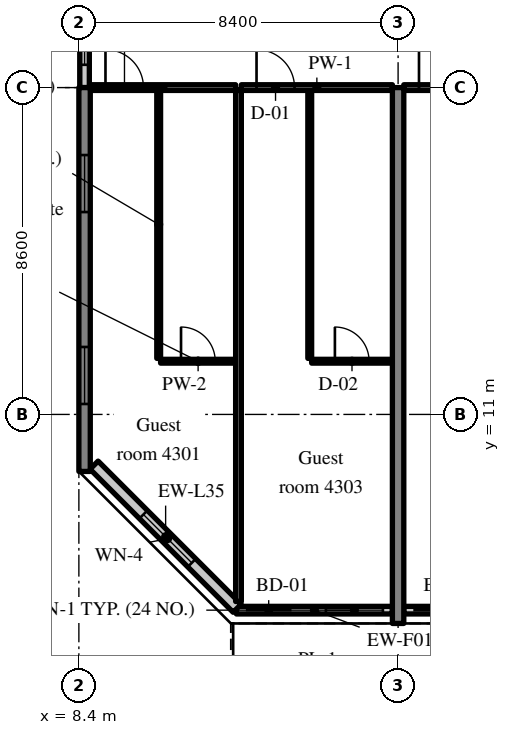
"""IFC4 building model, lengths in metres.
Left out: names, types, materials, properties, quantities, classifications, styles, units other than length and angle.
Written with IfcOpenShell. Run it as: python <this file> out.ifc"""

import sys

from ifc_helpers import new_model, si_unit, direction, frame, frame_2d, origin, place, context, subcontext, project, spatial, rectangle, extrude, source, transform, mapped, element, fill, save


model = new_model("IFC4")
c1 = context("Model", 3, precision=1e-05, world=origin(), true_north=direction((0.0, 1.0)))
c2 = subcontext(c1, "Body", "Model", "MODEL_VIEW")
j1 = project(units=[si_unit("LENGTHUNIT", "METRE"), si_unit("PLANEANGLEUNIT", "RADIAN")], contexts=[c1])
p1 = place(None, origin())
s1 = spatial("IfcSite", under=j1, at=p1, CompositionType="ELEMENT")
p2 = place(p1, origin())
s2 = spatial("IfcBuilding", under=s1, at=p2, CompositionType="ELEMENT")
p3 = place(p2, frame((0.0, 0.0, 178.2)))
s3 = spatial("IfcBuildingStorey", under=s2, at=p3, CompositionType="ELEMENT", Elevation=178.2)
m1 = source(origin(), c2, "Body", "SweptSolid", [
    extrude(rectangle(XDim=10.1, YDim=0.3, at=frame_2d((5.05, 0.0))), origin(), (0.0, 0.0, 1.0), 3.52),
])
p4 = place(p3, frame((8.55, 9.5, 0.0), z_axis=(0.0, 0.0, 1.0), x_axis=(0.0, 1.0, 0.0)))
e1 = element("IfcWall", 1, at=p4, inside=s3, PredefinedType="SHEAR", context=c2, shape_type="MappedRepresentation", body=[
    mapped(m1, transform((0.0, 0.0, 0.0), scale=1.0)),
])
m2 = source(origin(), c2, "Body", "SweptSolid", [
    extrude(rectangle(XDim=1.5, YDim=1.5, at=frame_2d((0.75, 0.75))), frame((0.0, 0.16, 0.0), z_axis=(0.0, -1.0, 0.0), x_axis=(1.0, 0.0, 0.0)), (0.0, 0.0, 1.0), 0.32),
])
p5 = place(p4, frame((1.775, 0.0, 0.9)))
e2 = element("IfcOpeningElement", 2, at=p5, cuts=e1, PredefinedType="OPENING", context=c2, shape_type="MappedRepresentation", body=[
    mapped(m2, transform((0.0, 0.0, 0.0), scale=1.0)),
])
p6 = place(p4, frame((6.825, 0.0, 0.9)))
e3 = element("IfcOpeningElement", 3, at=p6, cuts=e1, PredefinedType="OPENING", context=c2, shape_type="MappedRepresentation", body=[
    mapped(m2, transform((0.0, 0.0, 0.0), scale=1.0)),
])
m3 = source(origin(), c2, "Body", "SweptSolid", [
    extrude(rectangle(XDim=14.1, YDim=0.3, at=frame_2d((7.05, 0.0))), origin(), (0.0, 0.0, 1.0), 3.52),
])
p7 = place(p3, frame((16.8, 5.5, 0.0), z_axis=(0.0, 0.0, 1.0), x_axis=(0.0, 1.0, 0.0)))
e4 = element("IfcWall", 4, at=p7, inside=s3, PredefinedType="SHEAR", context=c2, shape_type="MappedRepresentation", body=[
    mapped(m3, transform((0.0, 0.0, 0.0), scale=1.0)),
])
m4 = source(origin(), c2, "Body", "SweptSolid", [
    extrude(rectangle(XDim=4.105, YDim=0.2, at=frame_2d((2.052, 0.0))), origin(), (0.0, 0.0, 1.0), 2.87),
])
p8 = place(p3, frame((12.545, 5.85, 0.0), z_axis=(0.0, 0.0, 1.0), x_axis=(1.0, 0.0, 0.0)))
e5 = element("IfcWall", 5, at=p8, inside=s3, PredefinedType="SOLIDWALL", context=c2, shape_type="MappedRepresentation", body=[
    mapped(m4, transform((0.0, 0.0, 0.0), scale=1.0)),
])
m5 = source(origin(), c2, "Body", "SweptSolid", [
    extrude(rectangle(XDim=1.2, YDim=2.4, at=frame_2d((0.6, 1.2))), frame((0.0, 0.11, 0.0), z_axis=(0.0, -1.0, 0.0), x_axis=(1.0, 0.0, 0.0)), (0.0, 0.0, 1.0), 0.22),
])
p9 = place(p8, frame((0.25, 0.0, 0.0)))
e6 = element("IfcOpeningElement", 6, at=p9, cuts=e5, PredefinedType="OPENING", context=c2, shape_type="MappedRepresentation", body=[
    mapped(m5, transform((0.0, 0.0, 0.0), scale=1.0)),
])
m6 = source(origin(), c2, "Body", "SweptSolid", [
    extrude(rectangle(XDim=1.5, YDim=1.5, at=frame_2d((0.75, 0.75))), frame((0.0, 0.11, 0.0), z_axis=(0.0, -1.0, 0.0), x_axis=(1.0, 0.0, 0.0)), (0.0, 0.0, 1.0), 0.22),
])
p10 = place(p8, frame((2.355, 0.0, 0.9)))
e7 = element("IfcOpeningElement", 7, at=p10, cuts=e5, PredefinedType="OPENING", context=c2, shape_type="MappedRepresentation", body=[
    mapped(m6, transform((0.0, 0.0, 0.0), scale=1.0)),
])
m7 = source(origin(), c2, "Body", "SweptSolid", [
    extrude(rectangle(XDim=8.1, YDim=0.2, at=frame_2d((4.05, 0.0))), origin(), (0.0, 0.0, 1.0), 2.87),
])
p11 = place(p3, frame((16.95, 5.85, 0.0), z_axis=(0.0, 0.0, 1.0), x_axis=(1.0, 0.0, 0.0)))
e8 = element("IfcWall", 8, at=p11, inside=s3, PredefinedType="SOLIDWALL", context=c2, shape_type="MappedRepresentation", body=[
    mapped(m7, transform((0.0, 0.0, 0.0), scale=1.0)),
])
p12 = place(p11, frame((0.25, 0.0, 0.0)))
e9 = element("IfcOpeningElement", 9, at=p12, cuts=e8, PredefinedType="OPENING", context=c2, shape_type="MappedRepresentation", body=[
    mapped(m5, transform((0.0, 0.0, 0.0), scale=1.0)),
])
p13 = place(p11, frame((2.3, 0.0, 0.9)))
e10 = element("IfcOpeningElement", 10, at=p13, cuts=e8, PredefinedType="OPENING", context=c2, shape_type="MappedRepresentation", body=[
    mapped(m6, transform((0.0, 0.0, 0.0), scale=1.0)),
])
p14 = place(p11, frame((4.3, 0.0, 0.0)))
e11 = element("IfcOpeningElement", 11, at=p14, cuts=e8, PredefinedType="OPENING", context=c2, shape_type="MappedRepresentation", body=[
    mapped(m5, transform((0.0, 0.0, 0.0), scale=1.0)),
])
p15 = place(p11, frame((6.35, 0.0, 0.9)))
e12 = element("IfcOpeningElement", 12, at=p15, cuts=e8, PredefinedType="OPENING", context=c2, shape_type="MappedRepresentation", body=[
    mapped(m6, transform((0.0, 0.0, 0.0), scale=1.0)),
])
m8 = source(origin(), c2, "Body", "SweptSolid", [
    extrude(rectangle(XDim=5.326, YDim=0.3, at=frame_2d((2.663, 0.0))), origin(), (0.0, 0.0, 1.0), 3.52),
])
p16 = place(p3, frame((8.8, 9.666, 0.0), z_axis=(0.0, 0.0, 1.0), x_axis=(0.707083859269, -0.707129702361, 0.0)))
e13 = element("IfcWall", 13, at=p16, inside=s3, PredefinedType="SOLIDWALL", context=c2, shape_type="MappedRepresentation", body=[
    mapped(m8, transform((0.0, 0.0, 0.0), scale=1.0)),
])
m9 = source(origin(), c2, "Body", "SweptSolid", [
    extrude(rectangle(XDim=1.8, YDim=1.5, at=frame_2d((0.9, 0.75))), frame((0.0, 0.16, 0.0), z_axis=(0.0, -1.0, 0.0), x_axis=(1.0, 0.0, 0.0)), (0.0, 0.0, 1.0), 0.32),
])
p17 = place(p16, frame((1.836, 0.0, 0.9)))
e14 = element("IfcOpeningElement", 14, at=p17, cuts=e13, PredefinedType="OPENING", context=c2, shape_type="MappedRepresentation", body=[
    mapped(m9, transform((0.0, 0.0, 0.0), scale=1.0)),
])
m10 = source(origin(), c2, "Body", "SweptSolid", [
    extrude(rectangle(XDim=2.4, YDim=0.25, at=frame_2d((1.2, 0.0))), origin(), (0.0, 0.0, 1.0), 2.62),
])
p18 = place(p3, frame((8.55, 19.6, 0.0), z_axis=(0.0, 0.0, 1.0), x_axis=(0.0, 1.0, 0.0)))
e15 = element("IfcWall", 15, at=p18, inside=s3, PredefinedType="SOLIDWALL", context=c2, shape_type="MappedRepresentation", body=[
    mapped(m10, transform((0.0, 0.0, 0.0), scale=1.0)),
])
m11 = source(origin(), c2, "Body", "SweptSolid", [
    extrude(rectangle(XDim=1.2, YDim=1.5, at=frame_2d((0.6, 0.75))), frame((0.0, 0.135, 0.0), z_axis=(0.0, -1.0, 0.0), x_axis=(1.0, 0.0, 0.0)), (0.0, 0.0, 1.0), 0.27),
])
p19 = place(p18, frame((0.6, 0.0, 0.9)))
e16 = element("IfcOpeningElement", 16, at=p19, cuts=e15, PredefinedType="OPENING", context=c2, shape_type="MappedRepresentation", body=[
    mapped(m11, transform((0.0, 0.0, 0.0), scale=1.0)),
])
m12 = source(origin(), c2, "Body", "SweptSolid", [
    extrude(rectangle(XDim=7.05, YDim=0.1, at=frame_2d((3.525, 0.0))), origin(), (0.0, 0.0, 1.0), 3.52),
])
p20 = place(p3, frame((10.5, 12.475, 0.0), z_axis=(0.0, 0.0, 1.0), x_axis=(0.0, 1.0, 0.0)))
e17 = element("IfcWall", 17, at=p20, inside=s3, PredefinedType="PARTITIONING", context=c2, shape_type="MappedRepresentation", body=[
    mapped(m12, transform((0.0, 0.0, 0.0), scale=1.0)),
])
m13 = source(origin(), c2, "Body", "SweptSolid", [
    extrude(rectangle(XDim=1.975, YDim=0.1, at=frame_2d((0.987, 0.0))), origin(), (0.0, 0.0, 1.0), 3.52),
])
p21 = place(p3, frame((10.55, 12.4, 0.0), z_axis=(0.0, 0.0, 1.0), x_axis=(1.0, 0.0, 0.0)))
e18 = element("IfcWall", 18, at=p21, inside=s3, PredefinedType="PARTITIONING", context=c2, shape_type="MappedRepresentation", body=[
    mapped(m13, transform((0.0, 0.0, 0.0), scale=1.0)),
])
m14 = source(origin(), c2, "Body", "SweptSolid", [
    extrude(rectangle(XDim=0.9, YDim=2.1, at=frame_2d((0.45, 1.05))), frame((0.0, 0.06, 0.0), z_axis=(0.0, -1.0, 0.0), x_axis=(1.0, 0.0, 0.0)), (0.0, 0.0, 1.0), 0.12),
])
p22 = place(p21, frame((0.538, 0.0, 0.0)))
e19 = element("IfcOpeningElement", 19, at=p22, cuts=e18, PredefinedType="OPENING", context=c2, shape_type="MappedRepresentation", body=[
    mapped(m14, transform((0.0, 0.0, 0.0), scale=1.0)),
])
m15 = source(origin(), c2, "Body", "SweptSolid", [
    extrude(rectangle(XDim=3.825, YDim=0.15, at=frame_2d((1.913, 0.0))), origin(), (0.0, 0.0, 1.0), 2.82),
])
p23 = place(p3, frame((8.7, 19.6, 0.0), z_axis=(0.0, 0.0, 1.0), x_axis=(1.0, 0.0, 0.0)))
e20 = element("IfcWall", 20, at=p23, inside=s3, PredefinedType="PARTITIONING", context=c2, shape_type="MappedRepresentation", body=[
    mapped(m15, transform((0.0, 0.0, 0.0), scale=1.0)),
])
m16 = source(origin(), c2, "Body", "SweptSolid", [
    extrude(rectangle(XDim=1.0, YDim=2.1, at=frame_2d((0.5, 1.05))), frame((0.0, 0.085, 0.0), z_axis=(0.0, -1.0, 0.0), x_axis=(1.0, 0.0, 0.0)), (0.0, 0.0, 1.0), 0.17),
])
p24 = place(p23, frame((0.4, 0.0, 0.0)))
e21 = element("IfcOpeningElement", 21, at=p24, cuts=e20, PredefinedType="OPENING", context=c2, shape_type="MappedRepresentation", body=[
    mapped(m16, transform((0.0, 0.0, 0.0), scale=1.0)),
])
p25 = place(p3, frame((14.475, 12.475, 0.0), z_axis=(0.0, 0.0, 1.0), x_axis=(0.0, 1.0, 0.0)))
e22 = element("IfcWall", 22, at=p25, inside=s3, PredefinedType="PARTITIONING", context=c2, shape_type="MappedRepresentation", body=[
    mapped(m12, transform((0.0, 0.0, 0.0), scale=1.0)),
])
m17 = source(origin(), c2, "Body", "SweptSolid", [
    extrude(rectangle(XDim=2.125, YDim=0.1, at=frame_2d((1.062, 0.0))), origin(), (0.0, 0.0, 1.0), 3.52),
])
p26 = place(p3, frame((14.525, 12.4, 0.0), z_axis=(0.0, 0.0, 1.0), x_axis=(1.0, 0.0, 0.0)))
e23 = element("IfcWall", 23, at=p26, inside=s3, PredefinedType="PARTITIONING", context=c2, shape_type="MappedRepresentation", body=[
    mapped(m17, transform((0.0, 0.0, 0.0), scale=1.0)),
])
p27 = place(p26, frame((0.612, 0.0, 0.0)))
e24 = element("IfcOpeningElement", 24, at=p27, cuts=e23, PredefinedType="OPENING", context=c2, shape_type="MappedRepresentation", body=[
    mapped(m14, transform((0.0, 0.0, 0.0), scale=1.0)),
])
m18 = source(origin(), c2, "Body", "SweptSolid", [
    extrude(rectangle(XDim=3.975, YDim=0.15, at=frame_2d((1.987, 0.0))), origin(), (0.0, 0.0, 1.0), 2.82),
])
p28 = place(p3, frame((12.675, 19.6, 0.0), z_axis=(0.0, 0.0, 1.0), x_axis=(1.0, 0.0, 0.0)))
e25 = element("IfcWall", 25, at=p28, inside=s3, PredefinedType="PARTITIONING", context=c2, shape_type="MappedRepresentation", body=[
    mapped(m18, transform((0.0, 0.0, 0.0), scale=1.0)),
])
p29 = place(p28, frame((0.4, 0.0, 0.0)))
e26 = element("IfcOpeningElement", 26, at=p29, cuts=e25, PredefinedType="OPENING", context=c2, shape_type="MappedRepresentation", body=[
    mapped(m16, transform((0.0, 0.0, 0.0), scale=1.0)),
])
m19 = source(origin(), c2, "Body", "SweptSolid", [
    extrude(rectangle(XDim=13.447, YDim=0.15, at=frame_2d((6.724, 0.0))), origin(), (0.0, 0.0, 1.0), 3.52),
])
p30 = place(p3, frame((12.6, 6.078, 0.0), z_axis=(0.0, 0.0, 1.0), x_axis=(0.0, 1.0, 0.0)))
e27 = element("IfcWall", 27, at=p30, inside=s3, PredefinedType="PARTITIONING", context=c2, shape_type="MappedRepresentation", body=[
    mapped(m19, transform((0.0, 0.0, 0.0), scale=1.0)),
])
m20 = source(origin(), c2, "Body", "SweptSolid", [
    extrude(rectangle(XDim=3.975, YDim=0.15, at=frame_2d((1.988, 0.0))), origin(), (0.0, 0.0, 1.0), 2.82),
])
p31 = place(p3, frame((16.95, 19.6, 0.0), z_axis=(0.0, 0.0, 1.0), x_axis=(1.0, 0.0, 0.0)))
e28 = element("IfcWall", 28, at=p31, inside=s3, PredefinedType="PARTITIONING", context=c2, shape_type="MappedRepresentation", body=[
    mapped(m20, transform((0.0, 0.0, 0.0), scale=1.0)),
])
p32 = place(p31, frame((0.4, 0.0, 0.0)))
e29 = element("IfcOpeningElement", 29, at=p32, cuts=e28, PredefinedType="OPENING", context=c2, shape_type="MappedRepresentation", body=[
    mapped(m16, transform((0.0, 0.0, 0.0), scale=1.0)),
])
m21 = source(origin(), c2, "Body", "SweptSolid", [
    extrude(rectangle(XDim=1.2, YDim=2.4, at=frame_2d((0.6, 1.2))), frame((0.0, 0.025, 0.0), z_axis=(0.0, -1.0, 0.0), x_axis=(1.0, 0.0, 0.0)), (0.0, 0.0, 1.0), 0.05),
])
p33 = place(p9, origin())
e30 = element("IfcDoor", 30, at=p33, inside=s3, OperationType="SLIDING_TO_LEFT", PredefinedType="DOOR", context=c2, shape_type="MappedRepresentation", body=[
    mapped(m21, transform((0.0, 0.0, 0.0), scale=1.0)),
])
fill(e6, e30)
m22 = source(origin(), c2, "Body", "SweptSolid", [
    extrude(rectangle(XDim=1.5, YDim=1.5, at=frame_2d((0.75, 0.75))), frame((0.0, 0.03, 0.0), z_axis=(0.0, -1.0, 0.0), x_axis=(1.0, 0.0, 0.0)), (0.0, 0.0, 1.0), 0.06),
])
p34 = place(p10, origin())
e31 = element("IfcWindow", 31, at=p34, inside=s3, PartitioningType="SINGLE_PANEL", PredefinedType="WINDOW", context=c2, shape_type="MappedRepresentation", body=[
    mapped(m22, transform((0.0, 0.0, 0.0), scale=1.0)),
])
fill(e7, e31)
p35 = place(p12, origin())
e32 = element("IfcDoor", 32, at=p35, inside=s3, OperationType="SLIDING_TO_RIGHT", PredefinedType="DOOR", context=c2, shape_type="MappedRepresentation", body=[
    mapped(m21, transform((0.0, 0.0, 0.0), scale=1.0)),
])
fill(e9, e32)
m23 = source(origin(), c2, "Body", "SweptSolid", [
    extrude(rectangle(XDim=1.8, YDim=1.5, at=frame_2d((0.9, 0.75))), frame((0.0, 0.03, 0.0), z_axis=(0.0, -1.0, 0.0), x_axis=(1.0, 0.0, 0.0)), (0.0, 0.0, 1.0), 0.06),
])
p36 = place(p17, origin())
e33 = element("IfcWindow", 33, at=p36, inside=s3, PartitioningType="SINGLE_PANEL", PredefinedType="WINDOW", context=c2, shape_type="MappedRepresentation", body=[
    mapped(m23, transform((0.0, 0.0, 0.0), scale=1.0)),
])
fill(e14, e33)
p37 = place(p5, origin())
e34 = element("IfcWindow", 34, at=p37, inside=s3, PartitioningType="SINGLE_PANEL", PredefinedType="WINDOW", context=c2, shape_type="MappedRepresentation", body=[
    mapped(m22, transform((0.0, 0.0, 0.0), scale=1.0)),
])
fill(e2, e34)
p38 = place(p6, origin())
e35 = element("IfcWindow", 35, at=p38, inside=s3, PartitioningType="SINGLE_PANEL", PredefinedType="WINDOW", context=c2, shape_type="MappedRepresentation", body=[
    mapped(m22, transform((0.0, 0.0, 0.0), scale=1.0)),
])
fill(e3, e35)
m24 = source(origin(), c2, "Body", "SweptSolid", [
    extrude(rectangle(XDim=1.2, YDim=1.5, at=frame_2d((0.6, 0.75))), frame((0.0, 0.03, 0.0), z_axis=(0.0, -1.0, 0.0), x_axis=(1.0, 0.0, 0.0)), (0.0, 0.0, 1.0), 0.06),
])
p39 = place(p19, origin())
e36 = element("IfcWindow", 36, at=p39, inside=s3, PartitioningType="SINGLE_PANEL", PredefinedType="WINDOW", context=c2, shape_type="MappedRepresentation", body=[
    mapped(m24, transform((0.0, 0.0, 0.0), scale=1.0)),
])
fill(e16, e36)
m25 = source(origin(), c2, "Body", "SweptSolid", [
    extrude(rectangle(XDim=0.9, YDim=2.1, at=frame_2d((0.45, 1.05))), frame((0.0, 0.025, 0.0), z_axis=(0.0, -1.0, 0.0), x_axis=(1.0, 0.0, 0.0)), (0.0, 0.0, 1.0), 0.05),
])
p40 = place(p22, origin())
e37 = element("IfcDoor", 37, at=p40, inside=s3, OperationType="SINGLE_SWING_LEFT", PredefinedType="DOOR", context=c2, shape_type="MappedRepresentation", body=[
    mapped(m25, transform((0.0, 0.0, 0.0), scale=1.0)),
])
fill(e19, e37)
m26 = source(origin(), c2, "Body", "SweptSolid", [
    extrude(rectangle(XDim=1.0, YDim=2.1, at=frame_2d((0.5, 1.05))), frame((0.0, 0.025, 0.0), z_axis=(0.0, -1.0, 0.0), x_axis=(1.0, 0.0, 0.0)), (0.0, 0.0, 1.0), 0.05),
])
p41 = place(p24, origin())
e38 = element("IfcDoor", 38, at=p41, inside=s3, OperationType="SINGLE_SWING_LEFT", PredefinedType="DOOR", context=c2, shape_type="MappedRepresentation", body=[
    mapped(m26, transform((0.0, 0.0, 0.0), scale=1.0)),
])
fill(e21, e38)
p42 = place(p27, origin())
e39 = element("IfcDoor", 39, at=p42, inside=s3, OperationType="SINGLE_SWING_LEFT", PredefinedType="DOOR", context=c2, shape_type="MappedRepresentation", body=[
    mapped(m25, transform((0.0, 0.0, 0.0), scale=1.0)),
])
fill(e24, e39)
p43 = place(p29, origin())
e40 = element("IfcDoor", 40, at=p43, inside=s3, OperationType="SINGLE_SWING_LEFT", PredefinedType="DOOR", context=c2, shape_type="MappedRepresentation", body=[
    mapped(m26, transform((0.0, 0.0, 0.0), scale=1.0)),
])
fill(e26, e40)
p44 = place(p32, origin())
e41 = element("IfcDoor", 41, at=p44, inside=s3, OperationType="SINGLE_SWING_LEFT", PredefinedType="DOOR", context=c2, shape_type="MappedRepresentation", body=[
    mapped(m26, transform((0.0, 0.0, 0.0), scale=1.0)),
])
fill(e29, e41)
save(model, sys.argv[1])
